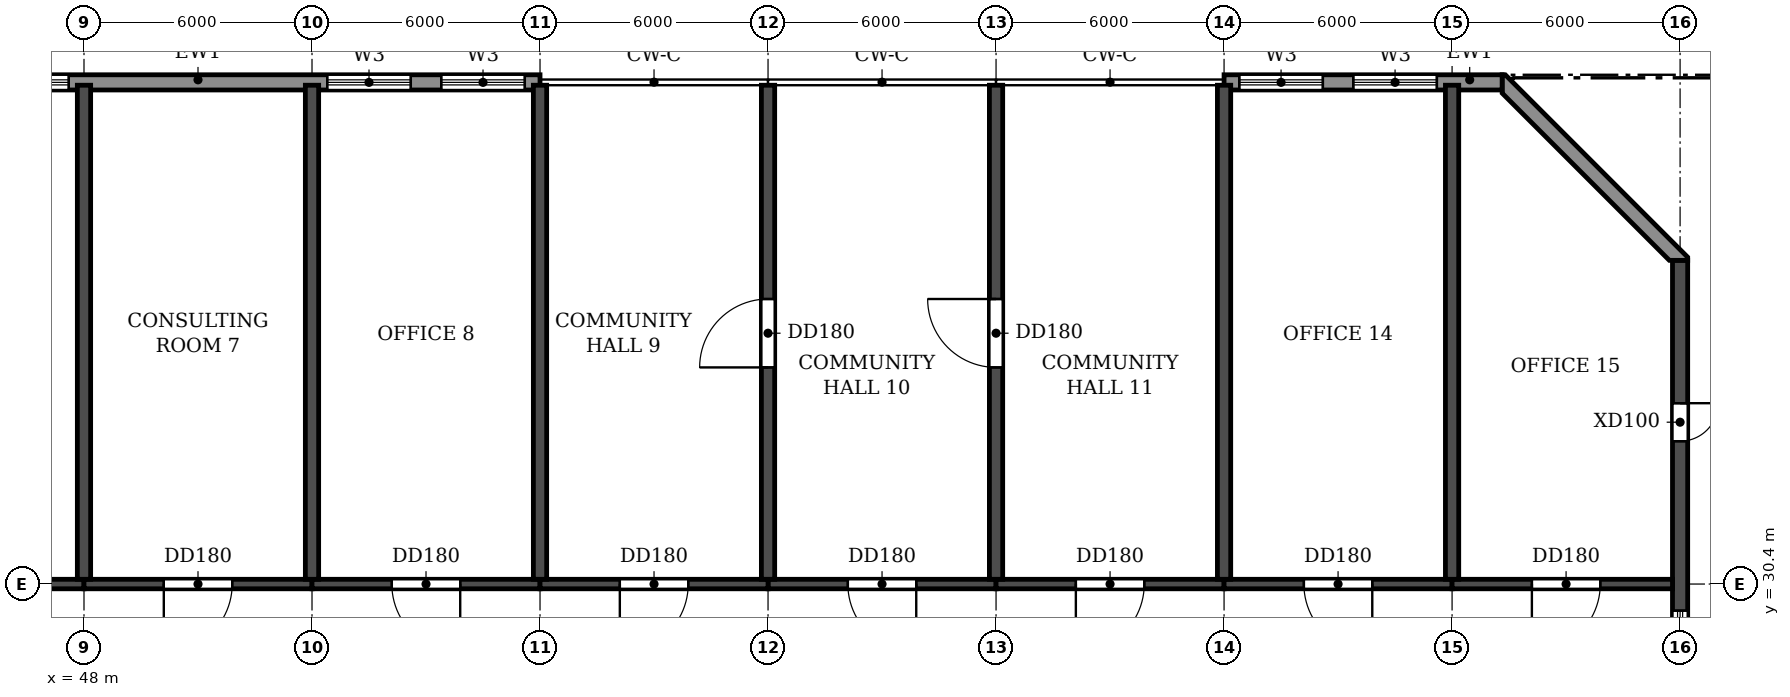
"""IFC4 building model, lengths in metres.
Left out: names, types, materials, properties, quantities, classifications, styles, units other than length and angle.
Written with IfcOpenShell. Run it as: python <this file> out.ifc"""

import sys

from ifc_helpers import new_model, si_unit, direction, frame, frame_2d, origin, place, context, subcontext, project, spatial, polyline, rectangle, outline, extrude, element, fill, save


model = new_model("IFC4")
c1 = context("Model", 3, precision=1e-05, world=origin(), true_north=direction((0.0, 1.0)))
c2 = subcontext(c1, "Body", "Model", "MODEL_VIEW")
j1 = project(units=[si_unit("LENGTHUNIT", "METRE"), si_unit("PLANEANGLEUNIT", "RADIAN")], contexts=[c1])
p1 = place(None, origin())
s1 = spatial("IfcSite", under=j1, at=p1, CompositionType="ELEMENT")
p2 = place(p1, origin())
s2 = spatial("IfcBuilding", under=s1, at=p2, CompositionType="ELEMENT")
p3 = place(p2, frame((0.0, 0.0, 105.9)))
s3 = spatial("IfcBuildingStorey", under=s2, at=p3, CompositionType="ELEMENT", Elevation=105.9)
for number, where, z_axis, x_axis in (
    (1, (48.0, 30.525, 0.0), (0.0, 0.0, 1.0), (0.0, 1.0, 0.0)),
    (2, (54.0, 30.525, 0.0), (0.0, 0.0, 1.0), (0.0, 1.0, 0.0)),
    (3, (60.0, 30.525, 0.0), (0.0, 0.0, 1.0), (0.0, 1.0, 0.0)),
):
    element("IfcWall", number, at=place(p3, frame(where, z_axis=z_axis, x_axis=x_axis)), inside=s3, PredefinedType="SHEAR", context=c2, shape_type="SweptSolid", body=[
        extrude(rectangle(XDim=13.0, YDim=0.35, at=frame_2d((6.5, 0.0))), origin(), (0.0, 0.0, 1.0), 3.06),
    ])
p4 = place(p3, frame((66.0, 30.525, 0.0), z_axis=(0.0, 0.0, 1.0), x_axis=(0.0, 1.0, 0.0)))
e4 = element("IfcWall", 4, at=p4, inside=s3, PredefinedType="SHEAR", context=c2, shape_type="SweptSolid", body=[
    extrude(rectangle(XDim=13.0, YDim=0.35, at=frame_2d((6.5, 0.0))), origin(), (0.0, 0.0, 1.0), 3.06),
])
p5 = place(p4, frame((5.575, 0.0, 0.0)))
e5 = element("IfcOpeningElement", 5, at=p5, cuts=e4, PredefinedType="OPENING", context=c2, shape_type="SweptSolid", body=[
    extrude(rectangle(XDim=1.8, YDim=2.1, at=frame_2d((0.9, 1.05))), frame((0.0, 0.185, 0.0), z_axis=(0.0, -1.0, 0.0), x_axis=(1.0, 0.0, 0.0)), (0.0, 0.0, 1.0), 0.37),
])
p6 = place(p3, frame((72.0, 30.525, 0.0), z_axis=(0.0, 0.0, 1.0), x_axis=(0.0, 1.0, 0.0)))
e6 = element("IfcWall", 6, at=p6, inside=s3, PredefinedType="SHEAR", context=c2, shape_type="SweptSolid", body=[
    extrude(rectangle(XDim=13.0, YDim=0.35, at=frame_2d((6.5, 0.0))), origin(), (0.0, 0.0, 1.0), 3.06),
])
p7 = place(p6, frame((5.575, 0.0, 0.0)))
e7 = element("IfcOpeningElement", 7, at=p7, cuts=e6, PredefinedType="OPENING", context=c2, shape_type="SweptSolid", body=[
    extrude(rectangle(XDim=1.8, YDim=2.1, at=frame_2d((0.9, 1.05))), frame((0.0, 0.185, 0.0), z_axis=(0.0, -1.0, 0.0), x_axis=(1.0, 0.0, 0.0)), (0.0, 0.0, 1.0), 0.37),
])
for number, where, z_axis, x_axis in (
    (8, (78.0, 30.525, 0.0), (0.0, 0.0, 1.0), (0.0, 1.0, 0.0)),
    (9, (84.0, 30.525, 0.0), (0.0, 0.0, 1.0), (0.0, 1.0, 0.0)),
):
    element("IfcWall", number, at=place(p3, frame(where, z_axis=z_axis, x_axis=x_axis)), inside=s3, PredefinedType="SHEAR", context=c2, shape_type="SweptSolid", body=[
        extrude(rectangle(XDim=13.0, YDim=0.35, at=frame_2d((6.5, 0.0))), origin(), (0.0, 0.0, 1.0), 3.06),
    ])
p8 = place(p3, frame((90.0, 4.683, 0.0), z_axis=(0.0, 0.0, 1.0), x_axis=(0.0, 1.0, 0.0)))
e10 = element("IfcWall", 10, at=p8, inside=s3, PredefinedType="SHEAR", context=c2, shape_type="SweptSolid", body=[
    extrude(rectangle(XDim=34.234, YDim=0.4, at=frame_2d((17.117, 0.0))), origin(), (0.0, 0.0, 1.0), 3.06),
])
p9 = place(p8, frame((15.917, 0.0, 0.9)))
e11 = element("IfcOpeningElement", 11, at=p9, cuts=e10, PredefinedType="OPENING", context=c2, shape_type="SweptSolid", body=[
    extrude(rectangle(XDim=1.2, YDim=1.5, at=frame_2d((0.6, 0.75))), frame((0.0, 0.21, 0.0), z_axis=(0.0, -1.0, 0.0), x_axis=(1.0, 0.0, 0.0)), (0.0, 0.0, 1.0), 0.42),
])
p10 = place(p8, frame((23.817, 0.0, 0.9)))
e12 = element("IfcOpeningElement", 12, at=p10, cuts=e10, PredefinedType="OPENING", context=c2, shape_type="SweptSolid", body=[
    extrude(rectangle(XDim=1.2, YDim=1.5, at=frame_2d((0.6, 0.75))), frame((0.0, 0.21, 0.0), z_axis=(0.0, -1.0, 0.0), x_axis=(1.0, 0.0, 0.0)), (0.0, 0.0, 1.0), 0.42),
])
p11 = place(p8, frame((8.017, 0.0, 0.9)))
e13 = element("IfcOpeningElement", 13, at=p11, cuts=e10, PredefinedType="OPENING", context=c2, shape_type="SweptSolid", body=[
    extrude(rectangle(XDim=1.2, YDim=1.5, at=frame_2d((0.6, 0.75))), frame((0.0, 0.21, 0.0), z_axis=(0.0, -1.0, 0.0), x_axis=(1.0, 0.0, 0.0)), (0.0, 0.0, 1.0), 0.42),
])
p12 = place(p8, frame((29.476, 0.0, 0.0)))
e14 = element("IfcOpeningElement", 14, at=p12, cuts=e10, PredefinedType="OPENING", context=c2, shape_type="SweptSolid", body=[
    extrude(rectangle(XDim=1.0, YDim=2.1, at=frame_2d((0.5, 1.05))), frame((0.0, 0.21, 0.0), z_axis=(0.0, -1.0, 0.0), x_axis=(1.0, 0.0, 0.0)), (0.0, 0.0, 1.0), 0.42),
])
p13 = place(p8, frame((3.159, 0.0, 0.0)))
e15 = element("IfcOpeningElement", 15, at=p13, cuts=e10, PredefinedType="OPENING", context=c2, shape_type="SweptSolid", body=[
    extrude(rectangle(XDim=1.0, YDim=2.1, at=frame_2d((0.5, 1.05))), frame((0.0, 0.21, 0.0), z_axis=(0.0, -1.0, 0.0), x_axis=(1.0, 0.0, 0.0)), (0.0, 0.0, 1.0), 0.42),
])
p14 = place(p3, frame((42.0, 30.4, 0.0), z_axis=(0.0, 0.0, 1.0), x_axis=(1.0, 0.0, 0.0)))
e16 = element("IfcWall", 16, at=p14, inside=s3, PredefinedType="SHEAR", context=c2, shape_type="SweptSolid", body=[
    extrude(rectangle(XDim=6.0, YDim=0.25, at=frame_2d((3.0, 0.0))), origin(), (0.0, 0.0, 1.0), 2.46),
])
p15 = place(p14, frame((2.1, 0.0, 0.0)))
e17 = element("IfcOpeningElement", 17, at=p15, cuts=e16, PredefinedType="OPENING", context=c2, shape_type="SweptSolid", body=[
    extrude(rectangle(XDim=1.8, YDim=2.1, at=frame_2d((0.9, 1.05))), frame((0.0, 0.135, 0.0), z_axis=(0.0, -1.0, 0.0), x_axis=(1.0, 0.0, 0.0)), (0.0, 0.0, 1.0), 0.27),
])
p16 = place(p3, frame((48.0, 30.4, 0.0), z_axis=(0.0, 0.0, 1.0), x_axis=(1.0, 0.0, 0.0)))
e18 = element("IfcWall", 18, at=p16, inside=s3, PredefinedType="SHEAR", context=c2, shape_type="SweptSolid", body=[
    extrude(rectangle(XDim=6.0, YDim=0.25, at=frame_2d((3.0, 0.0))), origin(), (0.0, 0.0, 1.0), 2.46),
])
p17 = place(p16, frame((2.1, 0.0, 0.0)))
e19 = element("IfcOpeningElement", 19, at=p17, cuts=e18, PredefinedType="OPENING", context=c2, shape_type="SweptSolid", body=[
    extrude(rectangle(XDim=1.8, YDim=2.1, at=frame_2d((0.9, 1.05))), frame((0.0, 0.135, 0.0), z_axis=(0.0, -1.0, 0.0), x_axis=(1.0, 0.0, 0.0)), (0.0, 0.0, 1.0), 0.27),
])
p18 = place(p3, frame((54.0, 30.4, 0.0), z_axis=(0.0, 0.0, 1.0), x_axis=(1.0, 0.0, 0.0)))
e20 = element("IfcWall", 20, at=p18, inside=s3, PredefinedType="SHEAR", context=c2, shape_type="SweptSolid", body=[
    extrude(rectangle(XDim=6.0, YDim=0.25, at=frame_2d((3.0, 0.0))), origin(), (0.0, 0.0, 1.0), 2.46),
])
p19 = place(p18, frame((2.1, 0.0, 0.0)))
e21 = element("IfcOpeningElement", 21, at=p19, cuts=e20, PredefinedType="OPENING", context=c2, shape_type="SweptSolid", body=[
    extrude(rectangle(XDim=1.8, YDim=2.1, at=frame_2d((0.9, 1.05))), frame((0.0, 0.135, 0.0), z_axis=(0.0, -1.0, 0.0), x_axis=(1.0, 0.0, 0.0)), (0.0, 0.0, 1.0), 0.27),
])
p20 = place(p3, frame((60.0, 30.4, 0.0), z_axis=(0.0, 0.0, 1.0), x_axis=(1.0, 0.0, 0.0)))
e22 = element("IfcWall", 22, at=p20, inside=s3, PredefinedType="SHEAR", context=c2, shape_type="SweptSolid", body=[
    extrude(rectangle(XDim=6.0, YDim=0.25, at=frame_2d((3.0, 0.0))), origin(), (0.0, 0.0, 1.0), 2.46),
])
p21 = place(p20, frame((2.1, 0.0, 0.0)))
e23 = element("IfcOpeningElement", 23, at=p21, cuts=e22, PredefinedType="OPENING", context=c2, shape_type="SweptSolid", body=[
    extrude(rectangle(XDim=1.8, YDim=2.1, at=frame_2d((0.9, 1.05))), frame((0.0, 0.135, 0.0), z_axis=(0.0, -1.0, 0.0), x_axis=(1.0, 0.0, 0.0)), (0.0, 0.0, 1.0), 0.27),
])
p22 = place(p3, frame((66.0, 30.4, 0.0), z_axis=(0.0, 0.0, 1.0), x_axis=(1.0, 0.0, 0.0)))
e24 = element("IfcWall", 24, at=p22, inside=s3, PredefinedType="SHEAR", context=c2, shape_type="SweptSolid", body=[
    extrude(rectangle(XDim=6.0, YDim=0.25, at=frame_2d((3.0, 0.0))), origin(), (0.0, 0.0, 1.0), 2.46),
])
p23 = place(p22, frame((2.1, 0.0, 0.0)))
e25 = element("IfcOpeningElement", 25, at=p23, cuts=e24, PredefinedType="OPENING", context=c2, shape_type="SweptSolid", body=[
    extrude(rectangle(XDim=1.8, YDim=2.1, at=frame_2d((0.9, 1.05))), frame((0.0, 0.135, 0.0), z_axis=(0.0, -1.0, 0.0), x_axis=(1.0, 0.0, 0.0)), (0.0, 0.0, 1.0), 0.27),
])
p24 = place(p3, frame((72.0, 30.4, 0.0), z_axis=(0.0, 0.0, 1.0), x_axis=(1.0, 0.0, 0.0)))
e26 = element("IfcWall", 26, at=p24, inside=s3, PredefinedType="SHEAR", context=c2, shape_type="SweptSolid", body=[
    extrude(rectangle(XDim=6.0, YDim=0.25, at=frame_2d((3.0, 0.0))), origin(), (0.0, 0.0, 1.0), 2.46),
])
p25 = place(p24, frame((2.1, 0.0, 0.0)))
e27 = element("IfcOpeningElement", 27, at=p25, cuts=e26, PredefinedType="OPENING", context=c2, shape_type="SweptSolid", body=[
    extrude(rectangle(XDim=1.8, YDim=2.1, at=frame_2d((0.9, 1.05))), frame((0.0, 0.135, 0.0), z_axis=(0.0, -1.0, 0.0), x_axis=(1.0, 0.0, 0.0)), (0.0, 0.0, 1.0), 0.27),
])
p26 = place(p3, frame((78.0, 30.4, 0.0), z_axis=(0.0, 0.0, 1.0), x_axis=(1.0, 0.0, 0.0)))
e28 = element("IfcWall", 28, at=p26, inside=s3, PredefinedType="SHEAR", context=c2, shape_type="SweptSolid", body=[
    extrude(rectangle(XDim=6.0, YDim=0.25, at=frame_2d((3.0, 0.0))), origin(), (0.0, 0.0, 1.0), 2.46),
])
p27 = place(p26, frame((2.1, 0.0, 0.0)))
e29 = element("IfcOpeningElement", 29, at=p27, cuts=e28, PredefinedType="OPENING", context=c2, shape_type="SweptSolid", body=[
    extrude(rectangle(XDim=1.8, YDim=2.1, at=frame_2d((0.9, 1.05))), frame((0.0, 0.135, 0.0), z_axis=(0.0, -1.0, 0.0), x_axis=(1.0, 0.0, 0.0)), (0.0, 0.0, 1.0), 0.27),
])
p28 = place(p3, frame((84.0, 30.4, 0.0), z_axis=(0.0, 0.0, 1.0), x_axis=(1.0, 0.0, 0.0)))
e30 = element("IfcWall", 30, at=p28, inside=s3, PredefinedType="SHEAR", context=c2, shape_type="SweptSolid", body=[
    extrude(rectangle(XDim=5.8, YDim=0.25, at=frame_2d((2.9, 0.0))), origin(), (0.0, 0.0, 1.0), 2.46),
])
p29 = place(p28, frame((2.1, 0.0, 0.0)))
e31 = element("IfcOpeningElement", 31, at=p29, cuts=e30, PredefinedType="OPENING", context=c2, shape_type="SweptSolid", body=[
    extrude(rectangle(XDim=1.8, YDim=2.1, at=frame_2d((0.9, 1.05))), frame((0.0, 0.135, 0.0), z_axis=(0.0, -1.0, 0.0), x_axis=(1.0, 0.0, 0.0)), (0.0, 0.0, 1.0), 0.27),
])
p30 = place(p3, origin())
e32 = element("IfcWall", 32, at=p30, inside=s3, PredefinedType="STANDARD", context=c2, shape_type="SweptSolid", body=[
    extrude(outline(polyline([(90.2, 38.917), (90.2, 39.0), (85.4, 43.8), (85.317, 43.8), (85.317, 43.317), (89.717, 38.917), (90.2, 38.917)])), origin(), (0.0, 0.0, 1.0), 3.06),
])
p31 = place(p3, frame((85.317, 43.6, 0.0), z_axis=(0.0, 0.0, 1.0), x_axis=(-1.0, 0.0, 0.0)))
e33 = element("IfcWall", 33, at=p31, inside=s3, PredefinedType="STANDARD", context=c2, shape_type="SweptSolid", body=[
    extrude(rectangle(XDim=7.317, YDim=0.4, at=frame_2d((3.659, 0.0))), origin(), (0.0, 0.0, 1.0), 3.06),
])
p32 = place(p31, frame((4.717, 0.0, 0.6)))
e34 = element("IfcOpeningElement", 34, at=p32, cuts=e33, PredefinedType="OPENING", context=c2, shape_type="SweptSolid", body=[
    extrude(rectangle(XDim=2.2, YDim=1.8, at=frame_2d((1.1, 0.9))), frame((0.0, 0.21, 0.0), z_axis=(0.0, -1.0, 0.0), x_axis=(1.0, 0.0, 0.0)), (0.0, 0.0, 1.0), 0.42),
])
p33 = place(p31, frame((1.717, 0.0, 0.6)))
e35 = element("IfcOpeningElement", 35, at=p33, cuts=e33, PredefinedType="OPENING", context=c2, shape_type="SweptSolid", body=[
    extrude(rectangle(XDim=2.2, YDim=1.8, at=frame_2d((1.1, 0.9))), frame((0.0, 0.21, 0.0), z_axis=(0.0, -1.0, 0.0), x_axis=(1.0, 0.0, 0.0)), (0.0, 0.0, 1.0), 0.42),
])
p34 = place(p3, frame((60.0, 43.6, 0.0), z_axis=(0.0, 0.0, 1.0), x_axis=(-1.0, 0.0, 0.0)))
e36 = element("IfcWall", 36, at=p34, inside=s3, PredefinedType="STANDARD", context=c2, shape_type="SweptSolid", body=[
    extrude(rectangle(XDim=18.0, YDim=0.4, at=frame_2d((9.0, 0.0))), origin(), (0.0, 0.0, 1.0), 3.06),
])
p35 = place(p34, frame((15.4, 0.0, 0.6)))
e37 = element("IfcOpeningElement", 37, at=p35, cuts=e36, PredefinedType="OPENING", context=c2, shape_type="SweptSolid", body=[
    extrude(rectangle(XDim=2.2, YDim=1.8, at=frame_2d((1.1, 0.9))), frame((0.0, 0.21, 0.0), z_axis=(0.0, -1.0, 0.0), x_axis=(1.0, 0.0, 0.0)), (0.0, 0.0, 1.0), 0.42),
])
p36 = place(p34, frame((12.4, 0.0, 0.6)))
e38 = element("IfcOpeningElement", 38, at=p36, cuts=e36, PredefinedType="OPENING", context=c2, shape_type="SweptSolid", body=[
    extrude(rectangle(XDim=2.2, YDim=1.8, at=frame_2d((1.1, 0.9))), frame((0.0, 0.21, 0.0), z_axis=(0.0, -1.0, 0.0), x_axis=(1.0, 0.0, 0.0)), (0.0, 0.0, 1.0), 0.42),
])
p37 = place(p34, frame((3.4, 0.0, 0.6)))
e39 = element("IfcOpeningElement", 39, at=p37, cuts=e36, PredefinedType="OPENING", context=c2, shape_type="SweptSolid", body=[
    extrude(rectangle(XDim=2.2, YDim=1.8, at=frame_2d((1.1, 0.9))), frame((0.0, 0.21, 0.0), z_axis=(0.0, -1.0, 0.0), x_axis=(1.0, 0.0, 0.0)), (0.0, 0.0, 1.0), 0.42),
])
p38 = place(p34, frame((0.4, 0.0, 0.6)))
e40 = element("IfcOpeningElement", 40, at=p38, cuts=e36, PredefinedType="OPENING", context=c2, shape_type="SweptSolid", body=[
    extrude(rectangle(XDim=2.2, YDim=1.8, at=frame_2d((1.1, 0.9))), frame((0.0, 0.21, 0.0), z_axis=(0.0, -1.0, 0.0), x_axis=(1.0, 0.0, 0.0)), (0.0, 0.0, 1.0), 0.42),
])
p39 = place(p10, origin())
e41 = element("IfcWindow", 41, at=p39, inside=s3, PartitioningType="SINGLE_PANEL", PredefinedType="WINDOW", context=c2, shape_type="SweptSolid", body=[
    extrude(rectangle(XDim=1.2, YDim=1.5, at=frame_2d((0.6, 0.75))), frame((0.0, 0.03, 0.0), z_axis=(0.0, -1.0, 0.0), x_axis=(1.0, 0.0, 0.0)), (0.0, 0.0, 1.0), 0.06),
])
fill(e12, e41)
p40 = place(p32, origin())
e42 = element("IfcWindow", 42, at=p40, inside=s3, PartitioningType="DOUBLE_PANEL_HORIZONTAL", PredefinedType="WINDOW", context=c2, shape_type="SweptSolid", body=[
    extrude(rectangle(XDim=2.2, YDim=1.8, at=frame_2d((1.1, 0.9))), frame((0.0, 0.03, 0.0), z_axis=(0.0, -1.0, 0.0), x_axis=(1.0, 0.0, 0.0)), (0.0, 0.0, 1.0), 0.06),
])
fill(e34, e42)
p41 = place(p33, origin())
e43 = element("IfcWindow", 43, at=p41, inside=s3, PartitioningType="DOUBLE_PANEL_HORIZONTAL", PredefinedType="WINDOW", context=c2, shape_type="SweptSolid", body=[
    extrude(rectangle(XDim=2.2, YDim=1.8, at=frame_2d((1.1, 0.9))), frame((0.0, 0.03, 0.0), z_axis=(0.0, -1.0, 0.0), x_axis=(1.0, 0.0, 0.0)), (0.0, 0.0, 1.0), 0.06),
])
fill(e35, e43)
p42 = place(p36, origin())
e44 = element("IfcWindow", 44, at=p42, inside=s3, PartitioningType="DOUBLE_PANEL_HORIZONTAL", PredefinedType="WINDOW", context=c2, shape_type="SweptSolid", body=[
    extrude(rectangle(XDim=2.2, YDim=1.8, at=frame_2d((1.1, 0.9))), frame((0.0, 0.03, 0.0), z_axis=(0.0, -1.0, 0.0), x_axis=(1.0, 0.0, 0.0)), (0.0, 0.0, 1.0), 0.06),
])
fill(e38, e44)
p43 = place(p37, origin())
e45 = element("IfcWindow", 45, at=p43, inside=s3, PartitioningType="DOUBLE_PANEL_HORIZONTAL", PredefinedType="WINDOW", context=c2, shape_type="SweptSolid", body=[
    extrude(rectangle(XDim=2.2, YDim=1.8, at=frame_2d((1.1, 0.9))), frame((0.0, 0.03, 0.0), z_axis=(0.0, -1.0, 0.0), x_axis=(1.0, 0.0, 0.0)), (0.0, 0.0, 1.0), 0.06),
])
fill(e39, e45)
p44 = place(p38, origin())
e46 = element("IfcWindow", 46, at=p44, inside=s3, PartitioningType="DOUBLE_PANEL_HORIZONTAL", PredefinedType="WINDOW", context=c2, shape_type="SweptSolid", body=[
    extrude(rectangle(XDim=2.2, YDim=1.8, at=frame_2d((1.1, 0.9))), frame((0.0, 0.03, 0.0), z_axis=(0.0, -1.0, 0.0), x_axis=(1.0, 0.0, 0.0)), (0.0, 0.0, 1.0), 0.06),
])
fill(e40, e46)
p45 = place(p17, frame((1.8, 0.0, 0.0), z_axis=(0.0, 0.0, 1.0), x_axis=(-1.0, 0.0, 0.0)))
e47 = element("IfcDoor", 47, at=p45, inside=s3, OperationType="DOUBLE_DOOR_SINGLE_SWING", PredefinedType="DOOR", context=c2, shape_type="SweptSolid", body=[
    extrude(rectangle(XDim=1.8, YDim=2.1, at=frame_2d((0.9, 1.05))), frame((0.0, 0.025, 0.0), z_axis=(0.0, -1.0, 0.0), x_axis=(1.0, 0.0, 0.0)), (0.0, 0.0, 1.0), 0.05),
])
fill(e19, e47)
p46 = place(p19, frame((1.8, 0.0, 0.0), z_axis=(0.0, 0.0, 1.0), x_axis=(-1.0, 0.0, 0.0)))
e48 = element("IfcDoor", 48, at=p46, inside=s3, OperationType="DOUBLE_DOOR_SINGLE_SWING", PredefinedType="DOOR", context=c2, shape_type="SweptSolid", body=[
    extrude(rectangle(XDim=1.8, YDim=2.1, at=frame_2d((0.9, 1.05))), frame((0.0, 0.025, 0.0), z_axis=(0.0, -1.0, 0.0), x_axis=(1.0, 0.0, 0.0)), (0.0, 0.0, 1.0), 0.05),
])
fill(e21, e48)
p47 = place(p21, frame((1.8, 0.0, 0.0), z_axis=(0.0, 0.0, 1.0), x_axis=(-1.0, 0.0, 0.0)))
e49 = element("IfcDoor", 49, at=p47, inside=s3, OperationType="DOUBLE_DOOR_SINGLE_SWING", PredefinedType="DOOR", context=c2, shape_type="SweptSolid", body=[
    extrude(rectangle(XDim=1.8, YDim=2.1, at=frame_2d((0.9, 1.05))), frame((0.0, 0.025, 0.0), z_axis=(0.0, -1.0, 0.0), x_axis=(1.0, 0.0, 0.0)), (0.0, 0.0, 1.0), 0.05),
])
fill(e23, e49)
p48 = place(p23, frame((1.8, 0.0, 0.0), z_axis=(0.0, 0.0, 1.0), x_axis=(-1.0, 0.0, 0.0)))
e50 = element("IfcDoor", 50, at=p48, inside=s3, OperationType="DOUBLE_DOOR_SINGLE_SWING", PredefinedType="DOOR", context=c2, shape_type="SweptSolid", body=[
    extrude(rectangle(XDim=1.8, YDim=2.1, at=frame_2d((0.9, 1.05))), frame((0.0, 0.025, 0.0), z_axis=(0.0, -1.0, 0.0), x_axis=(1.0, 0.0, 0.0)), (0.0, 0.0, 1.0), 0.05),
])
fill(e25, e50)
p49 = place(p25, frame((1.8, 0.0, 0.0), z_axis=(0.0, 0.0, 1.0), x_axis=(-1.0, 0.0, 0.0)))
e51 = element("IfcDoor", 51, at=p49, inside=s3, OperationType="DOUBLE_DOOR_SINGLE_SWING", PredefinedType="DOOR", context=c2, shape_type="SweptSolid", body=[
    extrude(rectangle(XDim=1.8, YDim=2.1, at=frame_2d((0.9, 1.05))), frame((0.0, 0.025, 0.0), z_axis=(0.0, -1.0, 0.0), x_axis=(1.0, 0.0, 0.0)), (0.0, 0.0, 1.0), 0.05),
])
fill(e27, e51)
p50 = place(p27, frame((1.8, 0.0, 0.0), z_axis=(0.0, 0.0, 1.0), x_axis=(-1.0, 0.0, 0.0)))
e52 = element("IfcDoor", 52, at=p50, inside=s3, OperationType="DOUBLE_DOOR_SINGLE_SWING", PredefinedType="DOOR", context=c2, shape_type="SweptSolid", body=[
    extrude(rectangle(XDim=1.8, YDim=2.1, at=frame_2d((0.9, 1.05))), frame((0.0, 0.025, 0.0), z_axis=(0.0, -1.0, 0.0), x_axis=(1.0, 0.0, 0.0)), (0.0, 0.0, 1.0), 0.05),
])
fill(e29, e52)
p51 = place(p29, frame((1.8, 0.0, 0.0), z_axis=(0.0, 0.0, 1.0), x_axis=(-1.0, 0.0, 0.0)))
e53 = element("IfcDoor", 53, at=p51, inside=s3, OperationType="DOUBLE_DOOR_SINGLE_SWING", PredefinedType="DOOR", context=c2, shape_type="SweptSolid", body=[
    extrude(rectangle(XDim=1.8, YDim=2.1, at=frame_2d((0.9, 1.05))), frame((0.0, 0.025, 0.0), z_axis=(0.0, -1.0, 0.0), x_axis=(1.0, 0.0, 0.0)), (0.0, 0.0, 1.0), 0.05),
])
fill(e31, e53)
p52 = place(p5, origin())
e54 = element("IfcDoor", 54, at=p52, inside=s3, OperationType="DOUBLE_DOOR_SINGLE_SWING", PredefinedType="DOOR", context=c2, shape_type="SweptSolid", body=[
    extrude(rectangle(XDim=1.8, YDim=2.1, at=frame_2d((0.9, 1.05))), frame((0.0, 0.025, 0.0), z_axis=(0.0, -1.0, 0.0), x_axis=(1.0, 0.0, 0.0)), (0.0, 0.0, 1.0), 0.05),
])
fill(e5, e54)
p53 = place(p7, origin())
e55 = element("IfcDoor", 55, at=p53, inside=s3, OperationType="DOUBLE_DOOR_SINGLE_SWING", PredefinedType="DOOR", context=c2, shape_type="SweptSolid", body=[
    extrude(rectangle(XDim=1.8, YDim=2.1, at=frame_2d((0.9, 1.05))), frame((0.0, 0.025, 0.0), z_axis=(0.0, -1.0, 0.0), x_axis=(1.0, 0.0, 0.0)), (0.0, 0.0, 1.0), 0.05),
])
fill(e7, e55)
p54 = place(p12, frame((1.0, 0.0, 0.0), z_axis=(0.0, 0.0, 1.0), x_axis=(-1.0, 0.0, 0.0)))
e56 = element("IfcDoor", 56, at=p54, inside=s3, OperationType="SINGLE_SWING_LEFT", PredefinedType="DOOR", context=c2, shape_type="SweptSolid", body=[
    extrude(rectangle(XDim=1.0, YDim=2.1, at=frame_2d((0.5, 1.05))), frame((0.0, 0.025, 0.0), z_axis=(0.0, -1.0, 0.0), x_axis=(1.0, 0.0, 0.0)), (0.0, 0.0, 1.0), 0.05),
])
fill(e14, e56)
save(model, sys.argv[1])
